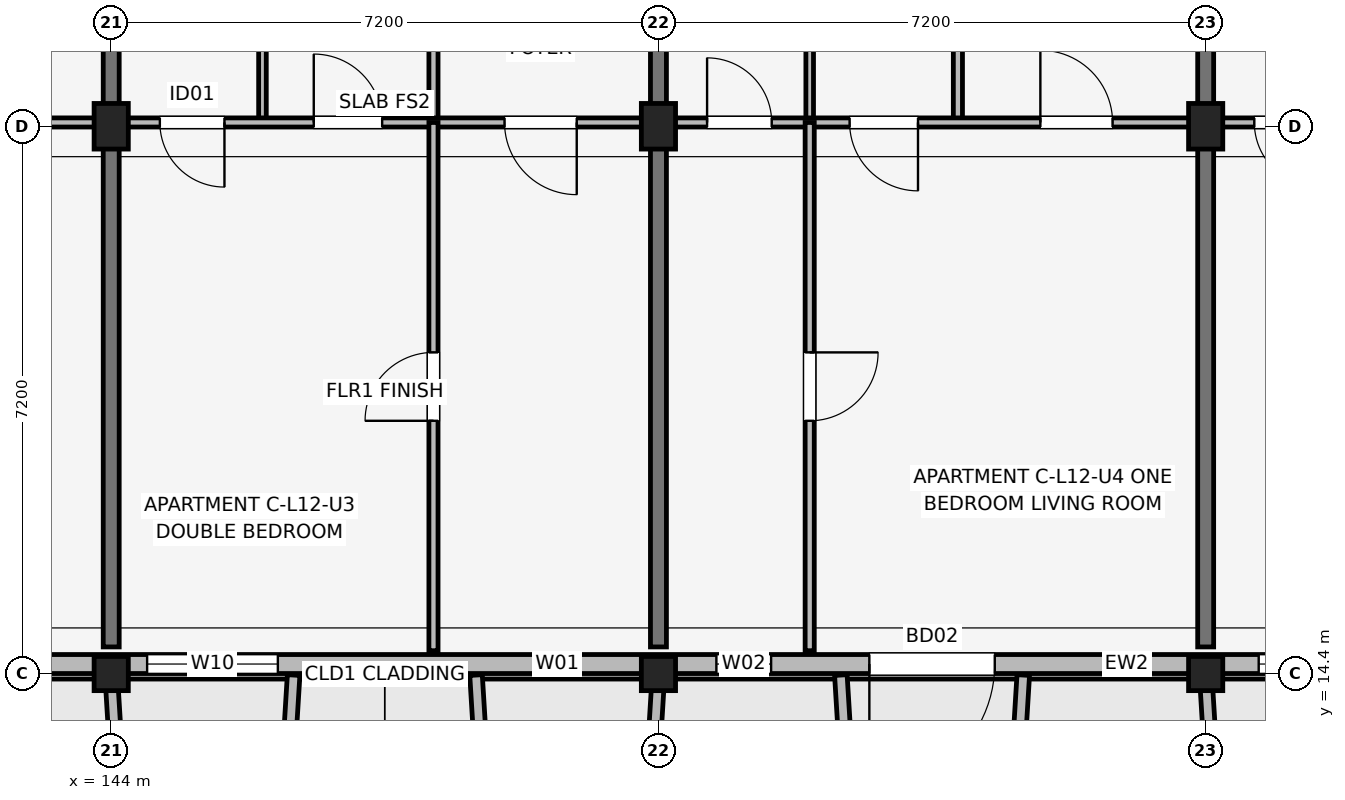
"""IFC4 building model, lengths in metres.
Left out: names, types, materials, properties, quantities, classifications, styles, units other than length and angle.
Written with IfcOpenShell. Run it as: python <this file> out.ifc"""

import sys

from ifc_helpers import new_model, si_unit, direction, frame, frame_2d, origin, origin_2d, place, context, subcontext, project, spatial, rectangle, extrude, element, fill, save


model = new_model("IFC4")
c1 = context("Model", 3, precision=1e-05, world=origin(), true_north=direction((0.0, 1.0)))
c2 = subcontext(c1, "Body", "Model", "MODEL_VIEW")
j1 = project(units=[si_unit("LENGTHUNIT", "METRE"), si_unit("PLANEANGLEUNIT", "RADIAN")], contexts=[c1])
p1 = place(None, origin())
s1 = spatial("IfcSite", under=j1, at=p1, CompositionType="ELEMENT")
p2 = place(p1, origin())
s2 = spatial("IfcBuilding", under=s1, at=p2, CompositionType="ELEMENT")
p3 = place(p2, frame((0.0, 0.0, 40.2)))
s3 = spatial("IfcBuildingStorey", under=s2, at=p3, CompositionType="ELEMENT", Elevation=40.2)
p4 = place(p3, frame((144.0, 14.4, 0.0), z_axis=(0.0, 0.0, 1.0), x_axis=(1.0, 0.0, 0.0)))
e1 = element("IfcColumn", 1, at=p4, inside=s3, PredefinedType="COLUMN", context=c2, shape_type="SweptSolid", body=[
    extrude(rectangle(XDim=0.45, YDim=0.45, at=origin_2d()), origin(), (0.0, 0.0, 1.0), 3.15),
])
p5 = place(p3, frame((144.0, 21.6, 0.0), z_axis=(0.0, 0.0, 1.0), x_axis=(1.0, 0.0, 0.0)))
e2 = element("IfcColumn", 2, at=p5, inside=s3, PredefinedType="COLUMN", context=c2, shape_type="SweptSolid", body=[
    extrude(rectangle(XDim=0.45, YDim=0.6, at=origin_2d()), origin(), (0.0, 0.0, 1.0), 3.15),
])
p6 = place(p3, frame((151.2, 14.4, 0.0), z_axis=(0.0, 0.0, 1.0), x_axis=(1.0, 0.0, 0.0)))
e3 = element("IfcColumn", 3, at=p6, inside=s3, PredefinedType="COLUMN", context=c2, shape_type="SweptSolid", body=[
    extrude(rectangle(XDim=0.45, YDim=0.45, at=origin_2d()), origin(), (0.0, 0.0, 1.0), 3.15),
])
p7 = place(p3, frame((151.2, 21.6, 0.0), z_axis=(0.0, 0.0, 1.0), x_axis=(1.0, 0.0, 0.0)))
e4 = element("IfcColumn", 4, at=p7, inside=s3, PredefinedType="COLUMN", context=c2, shape_type="SweptSolid", body=[
    extrude(rectangle(XDim=0.45, YDim=0.6, at=origin_2d()), origin(), (0.0, 0.0, 1.0), 3.15),
])
p8 = place(p3, frame((158.4, 14.4, 0.0), z_axis=(0.0, 0.0, 1.0), x_axis=(1.0, 0.0, 0.0)))
e5 = element("IfcColumn", 5, at=p8, inside=s3, PredefinedType="COLUMN", context=c2, shape_type="SweptSolid", body=[
    extrude(rectangle(XDim=0.45, YDim=0.45, at=origin_2d()), origin(), (0.0, 0.0, 1.0), 3.15),
])
p9 = place(p3, frame((158.4, 21.6, 0.0), z_axis=(0.0, 0.0, 1.0), x_axis=(1.0, 0.0, 0.0)))
e6 = element("IfcColumn", 6, at=p9, inside=s3, PredefinedType="COLUMN", context=c2, shape_type="SweptSolid", body=[
    extrude(rectangle(XDim=0.45, YDim=0.6, at=origin_2d()), origin(), (0.0, 0.0, 1.0), 3.15),
])
for number, where, z_axis, x_axis in (
    (7, (144.0, 14.75, 0.0), (0.0, 0.0, 1.0), (0.0, 1.0, 0.0)),
    (8, (151.2, 14.75, 0.0), (0.0, 0.0, 1.0), (0.0, 1.0, 0.0)),
    (9, (158.4, 14.75, 0.0), (0.0, 0.0, 1.0), (0.0, 1.0, 0.0)),
):
    element("IfcWall", number, at=place(p3, frame(where, z_axis=z_axis, x_axis=x_axis)), inside=s3, PredefinedType="SHEAR", context=c2, shape_type="SweptSolid", body=[
        extrude(rectangle(XDim=9.4, YDim=0.21, at=frame_2d((4.7, 0.0))), origin(), (0.0, 0.0, 1.0), 3.15),
    ])
p10 = place(p3, frame((132.6, 14.525, 0.0), z_axis=(0.0, 0.0, 1.0), x_axis=(1.0, 0.0, 0.0)))
e10 = element("IfcWall", 10, at=p10, inside=s3, PredefinedType="SOLIDWALL", context=c2, shape_type="SweptSolid", body=[
    extrude(rectangle(XDim=30.0, YDim=0.25, at=frame_2d((15.0, 0.0))), origin(), (0.0, 0.0, 1.0), 2.48),
])
p11 = place(p10, frame((8.7, 0.0, 0.0), z_axis=(0.0, 0.0, 1.0), x_axis=(-1.0, 0.0, 0.0)))
e11 = element("IfcOpeningElement", 11, at=p11, cuts=e10, PredefinedType="OPENING", context=c2, shape_type="SweptSolid", body=[
    extrude(rectangle(XDim=1.8, YDim=2.15, at=frame_2d((0.9, 1.075))), frame((0.0, 0.135, 0.0), z_axis=(0.0, -1.0, 0.0), x_axis=(1.0, 0.0, 0.0)), (0.0, 0.0, 1.0), 0.27),
])
p12 = place(p10, frame((23.025, 0.0, 0.0), z_axis=(0.0, 0.0, 1.0), x_axis=(-1.0, 0.0, 0.0)))
e12 = element("IfcOpeningElement", 12, at=p12, cuts=e10, PredefinedType="OPENING", context=c2, shape_type="SweptSolid", body=[
    extrude(rectangle(XDim=1.65, YDim=2.15, at=frame_2d((0.825, 1.075))), frame((0.0, 0.135, 0.0), z_axis=(0.0, -1.0, 0.0), x_axis=(1.0, 0.0, 0.0)), (0.0, 0.0, 1.0), 0.27),
])
p13 = place(p10, frame((2.077, 0.0, 0.7)))
e13 = element("IfcOpeningElement", 13, at=p13, cuts=e10, PredefinedType="OPENING", context=c2, shape_type="SweptSolid", body=[
    extrude(rectangle(XDim=1.58, YDim=1.6, at=frame_2d((0.79, 0.8))), frame((0.0, 0.135, 0.0), z_axis=(0.0, -1.0, 0.0), x_axis=(1.0, 0.0, 0.0)), (0.0, 0.0, 1.0), 0.27),
])
p14 = place(p10, frame((11.873, 0.0, 0.7)))
e14 = element("IfcOpeningElement", 14, at=p14, cuts=e10, PredefinedType="OPENING", context=c2, shape_type="SweptSolid", body=[
    extrude(rectangle(XDim=1.72, YDim=1.6, at=frame_2d((0.86, 0.8))), frame((0.0, 0.135, 0.0), z_axis=(0.0, -1.0, 0.0), x_axis=(1.0, 0.0, 0.0)), (0.0, 0.0, 1.0), 0.27),
])
p15 = place(p10, frame((16.968, 0.0, 0.75)))
e15 = element("IfcOpeningElement", 15, at=p15, cuts=e10, PredefinedType="OPENING", context=c2, shape_type="SweptSolid", body=[
    extrude(rectangle(XDim=0.6, YDim=1.25, at=frame_2d((0.3, 0.625))), frame((0.0, 0.135, 0.0), z_axis=(0.0, -1.0, 0.0), x_axis=(1.0, 0.0, 0.0)), (0.0, 0.0, 1.0), 0.27),
])
p16 = place(p10, frame((19.363, 0.0, 0.75)))
e16 = element("IfcOpeningElement", 16, at=p16, cuts=e10, PredefinedType="OPENING", context=c2, shape_type="SweptSolid", body=[
    extrude(rectangle(XDim=0.72, YDim=1.35, at=frame_2d((0.36, 0.675))), frame((0.0, 0.135, 0.0), z_axis=(0.0, -1.0, 0.0), x_axis=(1.0, 0.0, 0.0)), (0.0, 0.0, 1.0), 0.27),
])
p17 = place(p10, frame((26.498, 0.0, 0.75)))
e17 = element("IfcOpeningElement", 17, at=p17, cuts=e10, PredefinedType="OPENING", context=c2, shape_type="SweptSolid", body=[
    extrude(rectangle(XDim=0.85, YDim=1.4, at=frame_2d((0.425, 0.7))), frame((0.0, 0.135, 0.0), z_axis=(0.0, -1.0, 0.0), x_axis=(1.0, 0.0, 0.0)), (0.0, 0.0, 1.0), 0.27),
])
p18 = place(p10, frame((28.525, 0.0, 0.75)))
e18 = element("IfcOpeningElement", 18, at=p18, cuts=e10, PredefinedType="OPENING", context=c2, shape_type="SweptSolid", body=[
    extrude(rectangle(XDim=0.98, YDim=1.45, at=frame_2d((0.49, 0.725))), frame((0.0, 0.135, 0.0), z_axis=(0.0, -1.0, 0.0), x_axis=(1.0, 0.0, 0.0)), (0.0, 0.0, 1.0), 0.27),
])
p19 = place(p3, frame((144.0, 14.38, 0.0), z_axis=(0.0, 0.0, 1.0), x_axis=(0.061170732449, -0.998127317276, 0.0)))
e19 = element("IfcWall", 19, at=p19, inside=s3, PredefinedType="ELEMENTEDWALL", context=c2, shape_type="SweptSolid", body=[
    extrude(rectangle(XDim=1.964, YDim=0.165, at=frame_2d((0.982, 0.0))), origin(), (0.0, 0.0, 1.0), 2.48),
])
for number, where, z_axis, x_axis in (
    (20, (146.4, 14.38, 0.0), (0.0, 0.0, 1.0), (-0.061, -0.998, 0.0)),
    (21, (148.8, 14.38, 0.0), (0.0, 0.0, 1.0), (0.061, -0.998, 0.0)),
):
    element("IfcWall", number, at=place(p3, frame(where, z_axis=z_axis, x_axis=x_axis)), inside=s3, PredefinedType="ELEMENTEDWALL", context=c2, shape_type="SweptSolid", body=[
        extrude(rectangle(XDim=1.964, YDim=0.165, at=frame_2d((0.982, 0.0))), origin(), (0.0, 0.0, 1.0), 2.53),
    ])
for number, where, z_axis, x_axis in (
    (22, (151.2, 14.38, 0.0), (0.0, 0.0, 1.0), (-0.061, -0.998, 0.0)),
    (23, (153.6, 14.38, 0.0), (0.0, 0.0, 1.0), (0.061, -0.998, 0.0)),
    (24, (156.0, 14.38, 0.0), (0.0, 0.0, 1.0), (-0.061, -0.998, 0.0)),
    (25, (158.4, 14.38, 0.0), (0.0, 0.0, 1.0), (0.061, -0.998, 0.0)),
):
    element("IfcWall", number, at=place(p3, frame(where, z_axis=z_axis, x_axis=x_axis)), inside=s3, PredefinedType="ELEMENTEDWALL", context=c2, shape_type="SweptSolid", body=[
        extrude(rectangle(XDim=1.964, YDim=0.165, at=frame_2d((0.982, 0.0))), origin(), (0.0, 0.0, 1.0), 2.48),
    ])
p20 = place(p3, frame((136.94, 21.65, 0.0), z_axis=(0.0, 0.0, 1.0), x_axis=(1.0, 0.0, 0.0)))
e26 = element("IfcWall", 26, at=p20, inside=s3, PredefinedType="PARTITIONING", context=c2, shape_type="SweptSolid", body=[
    extrude(rectangle(XDim=6.92, YDim=0.12, at=frame_2d((3.46, 0.0))), origin(), (0.0, 0.0, 1.0), 2.38),
])
p21 = place(p20, frame((1.35, 0.0, 0.0), z_axis=(0.0, 0.0, 1.0), x_axis=(-1.0, 0.0, 0.0)))
e27 = element("IfcOpeningElement", 27, at=p21, cuts=e26, PredefinedType="OPENING", context=c2, shape_type="SweptSolid", body=[
    extrude(rectangle(XDim=0.85, YDim=2.08, at=frame_2d((0.425, 1.04))), frame((0.0, 0.07, 0.0), z_axis=(0.0, -1.0, 0.0), x_axis=(1.0, 0.0, 0.0)), (0.0, 0.0, 1.0), 0.14),
])
p22 = place(p20, frame((2.375, 0.0, 0.0)))
e28 = element("IfcOpeningElement", 28, at=p22, cuts=e26, PredefinedType="OPENING", context=c2, shape_type="SweptSolid", body=[
    extrude(rectangle(XDim=0.9, YDim=2.08, at=frame_2d((0.45, 1.04))), frame((0.0, 0.07, 0.0), z_axis=(0.0, -1.0, 0.0), x_axis=(1.0, 0.0, 0.0)), (0.0, 0.0, 1.0), 0.14),
])
p23 = place(p20, frame((5.835, 0.0, 0.0), z_axis=(0.0, 0.0, 1.0), x_axis=(-1.0, 0.0, 0.0)))
e29 = element("IfcOpeningElement", 29, at=p23, cuts=e26, PredefinedType="OPENING", context=c2, shape_type="SweptSolid", body=[
    extrude(rectangle(XDim=0.95, YDim=2.08, at=frame_2d((0.475, 1.04))), frame((0.0, 0.07, 0.0), z_axis=(0.0, -1.0, 0.0), x_axis=(1.0, 0.0, 0.0)), (0.0, 0.0, 1.0), 0.14),
])
p24 = place(p3, frame((145.99, 21.65, 0.0), z_axis=(0.0, 0.0, 1.0), x_axis=(0.0, 1.0, 0.0)))
e30 = element("IfcWall", 30, at=p24, inside=s3, PredefinedType="PARTITIONING", context=c2, shape_type="SweptSolid", body=[
    extrude(rectangle(XDim=2.65, YDim=0.1, at=frame_2d((1.325, 0.0))), origin(), (0.0, 0.0, 1.0), 2.38),
])
p25 = place(p3, frame((148.24, 21.65, 0.0), z_axis=(0.0, 0.0, 1.0), x_axis=(0.0, 1.0, 0.0)))
e31 = element("IfcWall", 31, at=p25, inside=s3, PredefinedType="PARTITIONING", context=c2, shape_type="SweptSolid", body=[
    extrude(rectangle(XDim=2.65, YDim=0.12, at=frame_2d((1.325, 0.0))), origin(), (0.0, 0.0, 1.0), 2.38),
])
p26 = place(p3, frame((144.14, 21.65, 0.0), z_axis=(0.0, 0.0, 1.0), x_axis=(1.0, 0.0, 0.0)))
e32 = element("IfcWall", 32, at=p26, inside=s3, PredefinedType="PARTITIONING", context=c2, shape_type="SweptSolid", body=[
    extrude(rectangle(XDim=6.92, YDim=0.12, at=frame_2d((3.46, 0.0))), origin(), (0.0, 0.0, 1.0), 2.38),
])
p27 = place(p26, frame((1.35, 0.0, 0.0), z_axis=(0.0, 0.0, 1.0), x_axis=(-1.0, 0.0, 0.0)))
e33 = element("IfcOpeningElement", 33, at=p27, cuts=e32, PredefinedType="OPENING", context=c2, shape_type="SweptSolid", body=[
    extrude(rectangle(XDim=0.85, YDim=2.08, at=frame_2d((0.425, 1.04))), frame((0.0, 0.07, 0.0), z_axis=(0.0, -1.0, 0.0), x_axis=(1.0, 0.0, 0.0)), (0.0, 0.0, 1.0), 0.14),
])
p28 = place(p26, frame((2.525, 0.0, 0.0)))
e34 = element("IfcOpeningElement", 34, at=p28, cuts=e32, PredefinedType="OPENING", context=c2, shape_type="SweptSolid", body=[
    extrude(rectangle(XDim=0.9, YDim=2.08, at=frame_2d((0.45, 1.04))), frame((0.0, 0.07, 0.0), z_axis=(0.0, -1.0, 0.0), x_axis=(1.0, 0.0, 0.0)), (0.0, 0.0, 1.0), 0.14),
])
p29 = place(p26, frame((5.985, 0.0, 0.0), z_axis=(0.0, 0.0, 1.0), x_axis=(-1.0, 0.0, 0.0)))
e35 = element("IfcOpeningElement", 35, at=p29, cuts=e32, PredefinedType="OPENING", context=c2, shape_type="SweptSolid", body=[
    extrude(rectangle(XDim=0.95, YDim=2.08, at=frame_2d((0.475, 1.04))), frame((0.0, 0.07, 0.0), z_axis=(0.0, -1.0, 0.0), x_axis=(1.0, 0.0, 0.0)), (0.0, 0.0, 1.0), 0.14),
])
p30 = place(p3, frame((148.24, 14.7, 0.0), z_axis=(0.0, 0.0, 1.0), x_axis=(0.0, 1.0, 0.0)))
e36 = element("IfcWall", 36, at=p30, inside=s3, PredefinedType="PARTITIONING", context=c2, shape_type="SweptSolid", body=[
    extrude(rectangle(XDim=6.95, YDim=0.12, at=frame_2d((3.475, 0.0))), origin(), (0.0, 0.0, 1.0), 2.38),
])
p31 = place(p30, frame((3.025, 0.0, 0.0)))
e37 = element("IfcOpeningElement", 37, at=p31, cuts=e36, PredefinedType="OPENING", context=c2, shape_type="SweptSolid", body=[
    extrude(rectangle(XDim=0.9, YDim=2.08, at=frame_2d((0.45, 1.04))), frame((0.0, 0.07, 0.0), z_axis=(0.0, -1.0, 0.0), x_axis=(1.0, 0.0, 0.0)), (0.0, 0.0, 1.0), 0.14),
])
p32 = place(p3, frame((153.19, 21.65, 0.0), z_axis=(0.0, 0.0, 1.0), x_axis=(0.0, 1.0, 0.0)))
e38 = element("IfcWall", 38, at=p32, inside=s3, PredefinedType="PARTITIONING", context=c2, shape_type="SweptSolid", body=[
    extrude(rectangle(XDim=2.65, YDim=0.1, at=frame_2d((1.325, 0.0))), origin(), (0.0, 0.0, 1.0), 2.38),
])
p33 = place(p3, frame((155.14, 21.65, 0.0), z_axis=(0.0, 0.0, 1.0), x_axis=(0.0, 1.0, 0.0)))
e39 = element("IfcWall", 39, at=p33, inside=s3, PredefinedType="PARTITIONING", context=c2, shape_type="SweptSolid", body=[
    extrude(rectangle(XDim=2.65, YDim=0.12, at=frame_2d((1.325, 0.0))), origin(), (0.0, 0.0, 1.0), 2.38),
])
p34 = place(p3, frame((151.34, 21.65, 0.0), z_axis=(0.0, 0.0, 1.0), x_axis=(1.0, 0.0, 0.0)))
e40 = element("IfcWall", 40, at=p34, inside=s3, PredefinedType="PARTITIONING", context=c2, shape_type="SweptSolid", body=[
    extrude(rectangle(XDim=6.92, YDim=0.12, at=frame_2d((3.46, 0.0))), origin(), (0.0, 0.0, 1.0), 2.38),
])
p35 = place(p34, frame((0.5, 0.0, 0.0)))
e41 = element("IfcOpeningElement", 41, at=p35, cuts=e40, PredefinedType="OPENING", context=c2, shape_type="SweptSolid", body=[
    extrude(rectangle(XDim=0.85, YDim=2.08, at=frame_2d((0.425, 1.04))), frame((0.0, 0.07, 0.0), z_axis=(0.0, -1.0, 0.0), x_axis=(1.0, 0.0, 0.0)), (0.0, 0.0, 1.0), 0.14),
])
p36 = place(p34, frame((3.275, 0.0, 0.0), z_axis=(0.0, 0.0, 1.0), x_axis=(-1.0, 0.0, 0.0)))
e42 = element("IfcOpeningElement", 42, at=p36, cuts=e40, PredefinedType="OPENING", context=c2, shape_type="SweptSolid", body=[
    extrude(rectangle(XDim=0.9, YDim=2.08, at=frame_2d((0.45, 1.04))), frame((0.0, 0.07, 0.0), z_axis=(0.0, -1.0, 0.0), x_axis=(1.0, 0.0, 0.0)), (0.0, 0.0, 1.0), 0.14),
])
p37 = place(p34, frame((4.885, 0.0, 0.0)))
e43 = element("IfcOpeningElement", 43, at=p37, cuts=e40, PredefinedType="OPENING", context=c2, shape_type="SweptSolid", body=[
    extrude(rectangle(XDim=0.95, YDim=2.08, at=frame_2d((0.475, 1.04))), frame((0.0, 0.07, 0.0), z_axis=(0.0, -1.0, 0.0), x_axis=(1.0, 0.0, 0.0)), (0.0, 0.0, 1.0), 0.14),
])
p38 = place(p3, frame((153.19, 14.7, 0.0), z_axis=(0.0, 0.0, 1.0), x_axis=(0.0, 1.0, 0.0)))
e44 = element("IfcWall", 44, at=p38, inside=s3, PredefinedType="PARTITIONING", context=c2, shape_type="SweptSolid", body=[
    extrude(rectangle(XDim=6.95, YDim=0.12, at=frame_2d((3.475, 0.0))), origin(), (0.0, 0.0, 1.0), 2.38),
])
p39 = place(p38, frame((3.925, 0.0, 0.0), z_axis=(0.0, 0.0, 1.0), x_axis=(-1.0, 0.0, 0.0)))
e45 = element("IfcOpeningElement", 45, at=p39, cuts=e44, PredefinedType="OPENING", context=c2, shape_type="SweptSolid", body=[
    extrude(rectangle(XDim=0.9, YDim=2.08, at=frame_2d((0.45, 1.04))), frame((0.0, 0.07, 0.0), z_axis=(0.0, -1.0, 0.0), x_axis=(1.0, 0.0, 0.0)), (0.0, 0.0, 1.0), 0.14),
])
p40 = place(p3, frame((158.54, 21.65, 0.0), z_axis=(0.0, 0.0, 1.0), x_axis=(1.0, 0.0, 0.0)))
e46 = element("IfcWall", 46, at=p40, inside=s3, PredefinedType="PARTITIONING", context=c2, shape_type="SweptSolid", body=[
    extrude(rectangle(XDim=6.92, YDim=0.12, at=frame_2d((3.46, 0.0))), origin(), (0.0, 0.0, 1.0), 2.38),
])
p41 = place(p40, frame((1.35, 0.0, 0.0), z_axis=(0.0, 0.0, 1.0), x_axis=(-1.0, 0.0, 0.0)))
e47 = element("IfcOpeningElement", 47, at=p41, cuts=e46, PredefinedType="OPENING", context=c2, shape_type="SweptSolid", body=[
    extrude(rectangle(XDim=0.85, YDim=2.08, at=frame_2d((0.425, 1.04))), frame((0.0, 0.07, 0.0), z_axis=(0.0, -1.0, 0.0), x_axis=(1.0, 0.0, 0.0)), (0.0, 0.0, 1.0), 0.14),
])
p42 = place(p40, frame((2.255, 0.0, 0.0)))
e48 = element("IfcOpeningElement", 48, at=p42, cuts=e46, PredefinedType="OPENING", context=c2, shape_type="SweptSolid", body=[
    extrude(rectangle(XDim=0.9, YDim=2.08, at=frame_2d((0.45, 1.04))), frame((0.0, 0.07, 0.0), z_axis=(0.0, -1.0, 0.0), x_axis=(1.0, 0.0, 0.0)), (0.0, 0.0, 1.0), 0.14),
])
p43 = place(p40, frame((4.86, 0.0, 0.0), z_axis=(0.0, 0.0, 1.0), x_axis=(-1.0, 0.0, 0.0)))
e49 = element("IfcOpeningElement", 49, at=p43, cuts=e46, PredefinedType="OPENING", context=c2, shape_type="SweptSolid", body=[
    extrude(rectangle(XDim=0.95, YDim=2.08, at=frame_2d((0.475, 1.04))), frame((0.0, 0.07, 0.0), z_axis=(0.0, -1.0, 0.0), x_axis=(1.0, 0.0, 0.0)), (0.0, 0.0, 1.0), 0.14),
])
p44 = place(p12, origin())
e50 = element("IfcDoor", 50, at=p44, inside=s3, OperationType="SINGLE_SWING_LEFT", PredefinedType="DOOR", context=c2, shape_type="SweptSolid", body=[
    extrude(rectangle(XDim=1.65, YDim=2.15, at=frame_2d((0.825, 1.075))), frame((0.0, 0.025, 0.0), z_axis=(0.0, -1.0, 0.0), x_axis=(1.0, 0.0, 0.0)), (0.0, 0.0, 1.0), 0.05),
])
fill(e12, e50)
p45 = place(p14, origin())
e51 = element("IfcWindow", 51, at=p45, inside=s3, PartitioningType="SINGLE_PANEL", PredefinedType="WINDOW", context=c2, shape_type="SweptSolid", body=[
    extrude(rectangle(XDim=1.72, YDim=1.6, at=frame_2d((0.86, 0.8))), frame((0.0, 0.03, 0.0), z_axis=(0.0, -1.0, 0.0), x_axis=(1.0, 0.0, 0.0)), (0.0, 0.0, 1.0), 0.06),
])
fill(e14, e51)
p46 = place(p15, origin())
e52 = element("IfcWindow", 52, at=p46, inside=s3, PartitioningType="SINGLE_PANEL", PredefinedType="WINDOW", context=c2, shape_type="SweptSolid", body=[
    extrude(rectangle(XDim=0.6, YDim=1.25, at=frame_2d((0.3, 0.625))), frame((0.0, 0.03, 0.0), z_axis=(0.0, -1.0, 0.0), x_axis=(1.0, 0.0, 0.0)), (0.0, 0.0, 1.0), 0.06),
])
fill(e15, e52)
p47 = place(p16, origin())
e53 = element("IfcWindow", 53, at=p47, inside=s3, PartitioningType="SINGLE_PANEL", PredefinedType="WINDOW", context=c2, shape_type="SweptSolid", body=[
    extrude(rectangle(XDim=0.72, YDim=1.35, at=frame_2d((0.36, 0.675))), frame((0.0, 0.03, 0.0), z_axis=(0.0, -1.0, 0.0), x_axis=(1.0, 0.0, 0.0)), (0.0, 0.0, 1.0), 0.06),
])
fill(e16, e53)
p48 = place(p17, origin())
e54 = element("IfcWindow", 54, at=p48, inside=s3, PartitioningType="SINGLE_PANEL", PredefinedType="WINDOW", context=c2, shape_type="SweptSolid", body=[
    extrude(rectangle(XDim=0.85, YDim=1.4, at=frame_2d((0.425, 0.7))), frame((0.0, 0.03, 0.0), z_axis=(0.0, -1.0, 0.0), x_axis=(1.0, 0.0, 0.0)), (0.0, 0.0, 1.0), 0.06),
])
fill(e17, e54)
p49 = place(p27, origin())
e55 = element("IfcDoor", 55, at=p49, inside=s3, OperationType="SINGLE_SWING_RIGHT", PredefinedType="DOOR", context=c2, shape_type="SweptSolid", body=[
    extrude(rectangle(XDim=0.85, YDim=2.08, at=frame_2d((0.425, 1.04))), frame((0.0, 0.025, 0.0), z_axis=(0.0, -1.0, 0.0), x_axis=(1.0, 0.0, 0.0)), (0.0, 0.0, 1.0), 0.05),
])
fill(e33, e55)
p50 = place(p28, origin())
e56 = element("IfcDoor", 56, at=p50, inside=s3, OperationType="SINGLE_SWING_LEFT", PredefinedType="DOOR", context=c2, shape_type="SweptSolid", body=[
    extrude(rectangle(XDim=0.9, YDim=2.08, at=frame_2d((0.45, 1.04))), frame((0.0, 0.025, 0.0), z_axis=(0.0, -1.0, 0.0), x_axis=(1.0, 0.0, 0.0)), (0.0, 0.0, 1.0), 0.05),
])
fill(e34, e56)
p51 = place(p29, origin())
e57 = element("IfcDoor", 57, at=p51, inside=s3, OperationType="SINGLE_SWING_RIGHT", PredefinedType="DOOR", context=c2, shape_type="SweptSolid", body=[
    extrude(rectangle(XDim=0.95, YDim=2.08, at=frame_2d((0.475, 1.04))), frame((0.0, 0.025, 0.0), z_axis=(0.0, -1.0, 0.0), x_axis=(1.0, 0.0, 0.0)), (0.0, 0.0, 1.0), 0.05),
])
fill(e35, e57)
p52 = place(p31, origin())
e58 = element("IfcDoor", 58, at=p52, inside=s3, OperationType="SINGLE_SWING_LEFT", PredefinedType="DOOR", context=c2, shape_type="SweptSolid", body=[
    extrude(rectangle(XDim=0.9, YDim=2.08, at=frame_2d((0.45, 1.04))), frame((0.0, 0.025, 0.0), z_axis=(0.0, -1.0, 0.0), x_axis=(1.0, 0.0, 0.0)), (0.0, 0.0, 1.0), 0.05),
])
fill(e37, e58)
p53 = place(p35, origin())
e59 = element("IfcDoor", 59, at=p53, inside=s3, OperationType="SINGLE_SWING_LEFT", PredefinedType="DOOR", context=c2, shape_type="SweptSolid", body=[
    extrude(rectangle(XDim=0.85, YDim=2.08, at=frame_2d((0.425, 1.04))), frame((0.0, 0.025, 0.0), z_axis=(0.0, -1.0, 0.0), x_axis=(1.0, 0.0, 0.0)), (0.0, 0.0, 1.0), 0.05),
])
fill(e41, e59)
p54 = place(p36, origin())
e60 = element("IfcDoor", 60, at=p54, inside=s3, OperationType="SINGLE_SWING_RIGHT", PredefinedType="DOOR", context=c2, shape_type="SweptSolid", body=[
    extrude(rectangle(XDim=0.9, YDim=2.08, at=frame_2d((0.45, 1.04))), frame((0.0, 0.025, 0.0), z_axis=(0.0, -1.0, 0.0), x_axis=(1.0, 0.0, 0.0)), (0.0, 0.0, 1.0), 0.05),
])
fill(e42, e60)
p55 = place(p37, origin())
e61 = element("IfcDoor", 61, at=p55, inside=s3, OperationType="SINGLE_SWING_LEFT", PredefinedType="DOOR", context=c2, shape_type="SweptSolid", body=[
    extrude(rectangle(XDim=0.95, YDim=2.08, at=frame_2d((0.475, 1.04))), frame((0.0, 0.025, 0.0), z_axis=(0.0, -1.0, 0.0), x_axis=(1.0, 0.0, 0.0)), (0.0, 0.0, 1.0), 0.05),
])
fill(e43, e61)
p56 = place(p39, origin())
e62 = element("IfcDoor", 62, at=p56, inside=s3, OperationType="SINGLE_SWING_RIGHT", PredefinedType="DOOR", context=c2, shape_type="SweptSolid", body=[
    extrude(rectangle(XDim=0.9, YDim=2.08, at=frame_2d((0.45, 1.04))), frame((0.0, 0.025, 0.0), z_axis=(0.0, -1.0, 0.0), x_axis=(1.0, 0.0, 0.0)), (0.0, 0.0, 1.0), 0.05),
])
fill(e45, e62)
p57 = place(p41, origin())
e63 = element("IfcDoor", 63, at=p57, inside=s3, OperationType="SINGLE_SWING_RIGHT", PredefinedType="DOOR", context=c2, shape_type="SweptSolid", body=[
    extrude(rectangle(XDim=0.85, YDim=2.08, at=frame_2d((0.425, 1.04))), frame((0.0, 0.025, 0.0), z_axis=(0.0, -1.0, 0.0), x_axis=(1.0, 0.0, 0.0)), (0.0, 0.0, 1.0), 0.05),
])
fill(e47, e63)
save(model, sys.argv[1])
